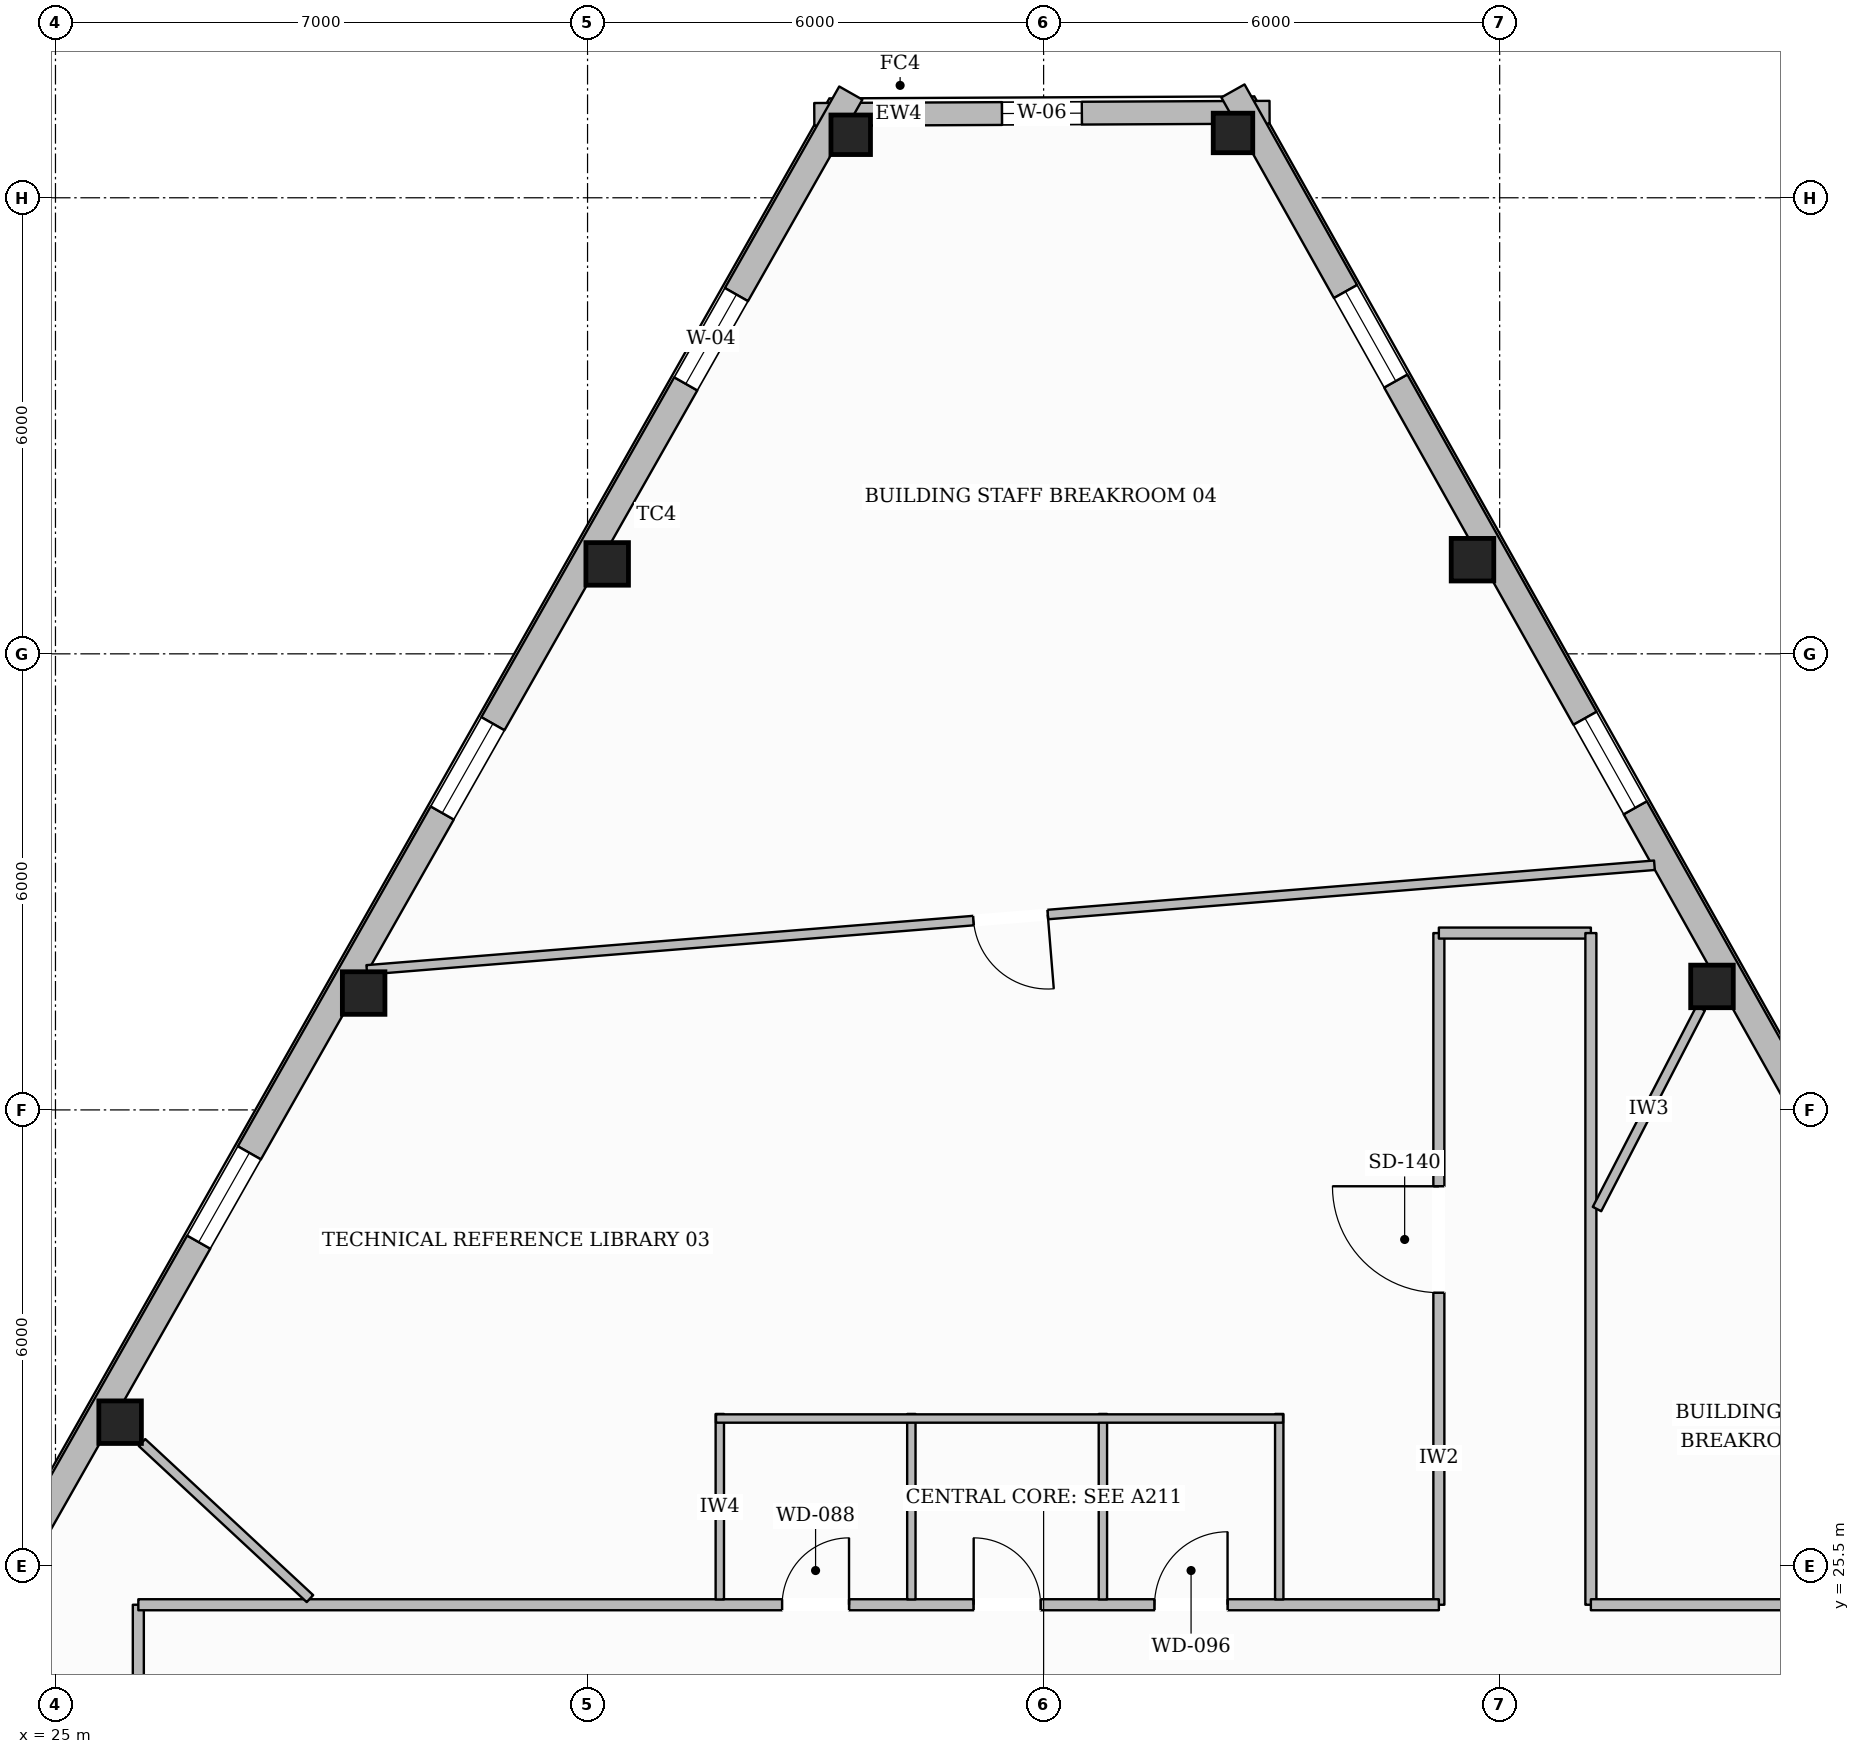
"""IFC4 building model, lengths in metres.
Left out: names, types, materials, properties, quantities, classifications, styles, units other than length and angle.
Written with IfcOpenShell. Run it as: python <this file> out.ifc"""

import sys

from ifc_helpers import new_model, si_unit, direction, frame, frame_2d, origin, origin_2d, place, context, subcontext, project, spatial, rectangle, hollow_rectangle, extrude, element, fill, save


model = new_model("IFC4")
c1 = context("Model", 3, precision=1e-05, world=origin(), true_north=direction((0.0, 1.0)))
c2 = subcontext(c1, "Body", "Model", "MODEL_VIEW")
j1 = project(units=[si_unit("LENGTHUNIT", "METRE"), si_unit("PLANEANGLEUNIT", "RADIAN")], contexts=[c1])
p1 = place(None, origin())
s1 = spatial("IfcSite", under=j1, at=p1, CompositionType="ELEMENT")
p2 = place(p1, origin())
s2 = spatial("IfcBuilding", under=s1, at=p2, CompositionType="ELEMENT")
p3 = place(p2, frame((0.0, 0.0, 301.1)))
s3 = spatial("IfcBuildingStorey", under=s2, at=p3, CompositionType="ELEMENT", Elevation=301.1)
p4 = place(p3, frame((35.462, 44.329, 0.0), z_axis=(0.0, 0.0, 1.0), x_axis=(1.0, 0.0, 0.0)))
e1 = element("IfcColumn", 1, at=p4, inside=s3, PredefinedType="COLUMN", context=c2, shape_type="SweptSolid", body=[
    extrude(hollow_rectangle(XDim=0.52, YDim=0.52, WallThickness=0.024, at=origin_2d()), origin(), (0.0, 0.0, 1.0), 3.635),
])
for number, where, z_axis, x_axis in (
    (2, (32.258, 38.683, 0.0), (0.0, 0.0, 1.0), (1.0, 0.0, 0.0)),
    (3, (29.054, 33.038, 0.0), (0.0, 0.0, 1.0), (1.0, 0.0, 0.0)),
    (4, (25.85, 27.392, 0.0), (0.0, 0.0, 1.0), (1.0, 0.0, 0.0)),
    (5, (46.793, 33.125, 0.0), (0.0, 0.0, 1.0), (1.0, 0.0, 0.0)),
    (6, (43.643, 38.739, 0.0), (0.0, 0.0, 1.0), (1.0, 0.0, 0.0)),
):
    element("IfcColumn", number, at=place(p3, frame(where, z_axis=z_axis, x_axis=x_axis)), inside=s3, PredefinedType="COLUMN", context=c2, shape_type="SweptSolid", body=[
        extrude(hollow_rectangle(XDim=0.56, YDim=0.56, WallThickness=0.025, at=origin_2d()), origin(), (0.0, 0.0, 1.0), 3.635),
    ])
p5 = place(p3, frame((40.492, 44.353, 0.0), z_axis=(0.0, 0.0, 1.0), x_axis=(1.0, 0.0, 0.0)))
e7 = element("IfcColumn", 7, at=p5, inside=s3, PredefinedType="COLUMN", context=c2, shape_type="SweptSolid", body=[
    extrude(hollow_rectangle(XDim=0.52, YDim=0.52, WallThickness=0.024, at=origin_2d()), origin(), (0.0, 0.0, 1.0), 3.635),
])
p6 = place(p3, frame((34.983, 44.596, 0.0), z_axis=(0.0, 0.0, 1.0), x_axis=(0.999988629955, 0.004768643558, 0.0)))
e8 = element("IfcWall", 8, at=p6, inside=s3, PredefinedType="STANDARD", context=c2, shape_type="SweptSolid", body=[
    extrude(rectangle(XDim=5.99, YDim=0.3, at=frame_2d((2.995, 0.0))), origin(), (0.0, 0.0, 1.0), 3.221),
])
p7 = place(p6, frame((2.47, 0.0, 0.65)))
e9 = element("IfcOpeningElement", 9, at=p7, cuts=e8, PredefinedType="OPENING", context=c2, shape_type="SweptSolid", body=[
    extrude(rectangle(XDim=1.05, YDim=1.7, at=frame_2d((0.525, 0.85))), frame((0.0, 0.16, 0.0), z_axis=(0.0, -1.0, 0.0), x_axis=(1.0, 0.0, 0.0)), (0.0, 0.0, 1.0), 0.32),
])
p8 = place(p3, frame((15.771, 10.179, 0.0), z_axis=(0.0, 0.0, 1.0), x_axis=(0.493569993775, 0.869706077503, 0.0)))
e10 = element("IfcWall", 10, at=p8, inside=s3, PredefinedType="STANDARD", context=c2, shape_type="SweptSolid", body=[
    extrude(rectangle(XDim=39.897, YDim=0.35, at=frame_2d((19.949, 0.0))), origin(), (0.0, 0.0, 1.0), 3.221),
])
p9 = place(p8, frame((35.499, 0.0, 0.65)))
e11 = element("IfcOpeningElement", 11, at=p9, cuts=e10, PredefinedType="OPENING", context=c2, shape_type="SweptSolid", body=[
    extrude(rectangle(XDim=1.35, YDim=1.75, at=frame_2d((0.675, 0.875))), frame((0.0, 0.185, 0.0), z_axis=(0.0, -1.0, 0.0), x_axis=(1.0, 0.0, 0.0)), (0.0, 0.0, 1.0), 0.37),
])
p10 = place(p8, frame((29.007, 0.0, 0.65)))
e12 = element("IfcOpeningElement", 12, at=p10, cuts=e10, PredefinedType="OPENING", context=c2, shape_type="SweptSolid", body=[
    extrude(rectangle(XDim=1.35, YDim=1.75, at=frame_2d((0.675, 0.875))), frame((0.0, 0.185, 0.0), z_axis=(0.0, -1.0, 0.0), x_axis=(1.0, 0.0, 0.0)), (0.0, 0.0, 1.0), 0.37),
])
p11 = place(p8, frame((22.516, 0.0, 0.65)))
e13 = element("IfcOpeningElement", 13, at=p11, cuts=e10, PredefinedType="OPENING", context=c2, shape_type="SweptSolid", body=[
    extrude(rectangle(XDim=1.35, YDim=1.75, at=frame_2d((0.675, 0.875))), frame((0.0, 0.185, 0.0), z_axis=(0.0, -1.0, 0.0), x_axis=(1.0, 0.0, 0.0)), (0.0, 0.0, 1.0), 0.37),
])
p12 = place(p8, frame((9.533, 0.0, 0.65)))
e14 = element("IfcOpeningElement", 14, at=p12, cuts=e10, PredefinedType="OPENING", context=c2, shape_type="SweptSolid", body=[
    extrude(rectangle(XDim=1.35, YDim=1.75, at=frame_2d((0.675, 0.875))), frame((0.0, 0.185, 0.0), z_axis=(0.0, -1.0, 0.0), x_axis=(1.0, 0.0, 0.0)), (0.0, 0.0, 1.0), 0.37),
])
p13 = place(p8, frame((3.042, 0.0, 0.65)))
e15 = element("IfcOpeningElement", 15, at=p13, cuts=e10, PredefinedType="OPENING", context=c2, shape_type="SweptSolid", body=[
    extrude(rectangle(XDim=1.35, YDim=1.75, at=frame_2d((0.675, 0.875))), frame((0.0, 0.185, 0.0), z_axis=(0.0, -1.0, 0.0), x_axis=(1.0, 0.0, 0.0)), (0.0, 0.0, 1.0), 0.37),
])
p14 = place(p3, frame((40.491, 44.906, 0.0), z_axis=(0.0, 0.0, 1.0), x_axis=(0.489429021632, -0.872043136997, 0.0)))
e16 = element("IfcWall", 16, at=p14, inside=s3, PredefinedType="STANDARD", context=c2, shape_type="SweptSolid", body=[
    extrude(rectangle(XDim=39.581, YDim=0.35, at=frame_2d((19.79, 0.0))), origin(), (0.0, 0.0, 1.0), 3.221),
])
p15 = place(p14, frame((29.085, 0.0, 0.0)))
e17 = element("IfcOpeningElement", 17, at=p15, cuts=e16, PredefinedType="OPENING", context=c2, shape_type="SweptSolid", body=[
    extrude(rectangle(XDim=1.0, YDim=2.2, at=frame_2d((0.5, 1.1))), frame((0.0, 0.185, 0.0), z_axis=(0.0, -1.0, 0.0), x_axis=(1.0, 0.0, 0.0)), (0.0, 0.0, 1.0), 0.37),
])
p16 = place(p14, frame((35.216, 0.0, 0.65)))
e18 = element("IfcOpeningElement", 18, at=p16, cuts=e16, PredefinedType="OPENING", context=c2, shape_type="SweptSolid", body=[
    extrude(rectangle(XDim=1.35, YDim=1.75, at=frame_2d((0.675, 0.875))), frame((0.0, 0.185, 0.0), z_axis=(0.0, -1.0, 0.0), x_axis=(1.0, 0.0, 0.0)), (0.0, 0.0, 1.0), 0.37),
])
p17 = place(p14, frame((22.34, 0.0, 0.65)))
e19 = element("IfcOpeningElement", 19, at=p17, cuts=e16, PredefinedType="OPENING", context=c2, shape_type="SweptSolid", body=[
    extrude(rectangle(XDim=1.35, YDim=1.75, at=frame_2d((0.675, 0.875))), frame((0.0, 0.185, 0.0), z_axis=(0.0, -1.0, 0.0), x_axis=(1.0, 0.0, 0.0)), (0.0, 0.0, 1.0), 0.37),
])
p18 = place(p14, frame((9.464, 0.0, 0.65)))
e20 = element("IfcOpeningElement", 20, at=p18, cuts=e16, PredefinedType="OPENING", context=c2, shape_type="SweptSolid", body=[
    extrude(rectangle(XDim=1.35, YDim=1.75, at=frame_2d((0.675, 0.875))), frame((0.0, 0.185, 0.0), z_axis=(0.0, -1.0, 0.0), x_axis=(1.0, 0.0, 0.0)), (0.0, 0.0, 1.0), 0.37),
])
p19 = place(p14, frame((3.026, 0.0, 0.65)))
e21 = element("IfcOpeningElement", 21, at=p19, cuts=e16, PredefinedType="OPENING", context=c2, shape_type="SweptSolid", body=[
    extrude(rectangle(XDim=1.35, YDim=1.75, at=frame_2d((0.675, 0.875))), frame((0.0, 0.185, 0.0), z_axis=(0.0, -1.0, 0.0), x_axis=(1.0, 0.0, 0.0)), (0.0, 0.0, 1.0), 0.37),
])
p20 = place(p3, frame((43.2, 24.99, 0.0), z_axis=(0.0, 0.0, 1.0), x_axis=(0.0, 1.0, 0.0)))
e22 = element("IfcWall", 22, at=p20, inside=s3, PredefinedType="PARTITIONING", context=c2, shape_type="SweptSolid", body=[
    extrude(rectangle(XDim=8.836, YDim=0.145, at=frame_2d((4.418, 0.0))), origin(), (0.0, 0.0, 1.0), 3.635),
])
p21 = place(p20, frame((4.105, 0.0, 0.0)))
e23 = element("IfcOpeningElement", 23, at=p21, cuts=e22, PredefinedType="OPENING", context=c2, shape_type="SweptSolid", body=[
    extrude(rectangle(XDim=1.4, YDim=2.2, at=frame_2d((0.7, 1.1))), frame((0.0, 0.083, 0.0), z_axis=(0.0, -1.0, 0.0), x_axis=(1.0, 0.0, 0.0)), (0.0, 0.0, 1.0), 0.165),
])
p22 = place(p3, frame((43.2, 33.826, 0.0), z_axis=(0.0, 0.0, 1.0), x_axis=(1.0, 0.0, 0.0)))
e24 = element("IfcWall", 24, at=p22, inside=s3, PredefinedType="PARTITIONING", context=c2, shape_type="SweptSolid", body=[
    extrude(rectangle(XDim=2.0, YDim=0.145, at=frame_2d((1.0, 0.0))), origin(), (0.0, 0.0, 1.0), 3.635),
])
p23 = place(p3, frame((45.2, 33.826, 0.0), z_axis=(0.0, 0.0, 1.0), x_axis=(0.0, -1.0, 0.0)))
e25 = element("IfcWall", 25, at=p23, inside=s3, PredefinedType="PARTITIONING", context=c2, shape_type="SweptSolid", body=[
    extrude(rectangle(XDim=8.836, YDim=0.145, at=frame_2d((4.418, 0.0))), origin(), (0.0, 0.0, 1.0), 3.635),
])
p24 = place(p3, frame((45.2, 24.99, 0.0), z_axis=(0.0, 0.0, 1.0), x_axis=(1.0, 0.0, 0.0)))
e26 = element("IfcWall", 26, at=p24, inside=s3, PredefinedType="PARTITIONING", context=c2, shape_type="SweptSolid", body=[
    extrude(rectangle(XDim=4.71, YDim=0.145, at=frame_2d((2.355, 0.0))), origin(), (0.0, 0.0, 1.0), 3.635),
])
p25 = place(p3, frame((26.09, 7.21, 0.0), z_axis=(0.0, 0.0, 1.0), x_axis=(0.0, 1.0, 0.0)))
e27 = element("IfcWall", 27, at=p25, inside=s3, PredefinedType="PARTITIONING", context=c2, shape_type="SweptSolid", body=[
    extrude(rectangle(XDim=17.78, YDim=0.145, at=frame_2d((8.89, 0.0))), origin(), (0.0, 0.0, 1.0), 3.374),
])
p26 = place(p25, frame((9.624, 0.0, 0.0)))
e28 = element("IfcOpeningElement", 28, at=p26, cuts=e27, PredefinedType="OPENING", context=c2, shape_type="SweptSolid", body=[
    extrude(rectangle(XDim=0.98, YDim=2.15, at=frame_2d((0.49, 1.075))), frame((0.0, 0.083, 0.0), z_axis=(0.0, -1.0, 0.0), x_axis=(1.0, 0.0, 0.0)), (0.0, 0.0, 1.0), 0.165),
])
p27 = place(p3, frame((26.09, 24.99, 0.0), z_axis=(0.0, 0.0, 1.0), x_axis=(1.0, 0.0, 0.0)))
e29 = element("IfcWall", 29, at=p27, inside=s3, PredefinedType="PARTITIONING", context=c2, shape_type="SweptSolid", body=[
    extrude(rectangle(XDim=17.11, YDim=0.145, at=frame_2d((8.555, 0.0))), origin(), (0.0, 0.0, 1.0), 3.635),
])
p28 = place(p27, frame((8.47, 0.0, 0.0)))
e30 = element("IfcOpeningElement", 30, at=p28, cuts=e29, PredefinedType="OPENING", context=c2, shape_type="SweptSolid", body=[
    extrude(rectangle(XDim=0.88, YDim=2.1, at=frame_2d((0.44, 1.05))), frame((0.0, 0.083, 0.0), z_axis=(0.0, -1.0, 0.0), x_axis=(1.0, 0.0, 0.0)), (0.0, 0.0, 1.0), 0.165),
])
p29 = place(p27, frame((10.99, 0.0, 0.0)))
e31 = element("IfcOpeningElement", 31, at=p29, cuts=e29, PredefinedType="OPENING", context=c2, shape_type="SweptSolid", body=[
    extrude(rectangle(XDim=0.88, YDim=2.1, at=frame_2d((0.44, 1.05))), frame((0.0, 0.083, 0.0), z_axis=(0.0, -1.0, 0.0), x_axis=(1.0, 0.0, 0.0)), (0.0, 0.0, 1.0), 0.165),
])
p30 = place(p27, frame((13.37, 0.0, 0.0)))
e32 = element("IfcOpeningElement", 32, at=p30, cuts=e29, PredefinedType="OPENING", context=c2, shape_type="SweptSolid", body=[
    extrude(rectangle(XDim=0.96, YDim=2.1, at=frame_2d((0.48, 1.05))), frame((0.0, 0.083, 0.0), z_axis=(0.0, -1.0, 0.0), x_axis=(1.0, 0.0, 0.0)), (0.0, 0.0, 1.0), 0.165),
])
for number, where, z_axis, x_axis in (
    (33, (33.74, 25.06, 0.0), (0.0, 0.0, 1.0), (0.0, 1.0, 0.0)),
    (34, (36.26, 25.06, 0.0), (0.0, 0.0, 1.0), (0.0, 1.0, 0.0)),
    (35, (38.78, 25.06, 0.0), (0.0, 0.0, 1.0), (0.0, 1.0, 0.0)),
    (36, (41.1, 25.06, 0.0), (0.0, 0.0, 1.0), (0.0, 1.0, 0.0)),
):
    element("IfcWall", number, at=place(p3, frame(where, z_axis=z_axis, x_axis=x_axis)), inside=s3, PredefinedType="PLUMBINGWALL", context=c2, shape_type="SweptSolid", body=[
        extrude(rectangle(XDim=2.44, YDim=0.11, at=frame_2d((1.22, 0.0))), origin(), (0.0, 0.0, 1.0), 3.635),
    ])
p31 = place(p3, frame((33.69, 27.44, 0.0), z_axis=(0.0, 0.0, 1.0), x_axis=(1.0, 0.0, 0.0)))
e37 = element("IfcWall", 37, at=p31, inside=s3, PredefinedType="PLUMBINGWALL", context=c2, shape_type="SweptSolid", body=[
    extrude(rectangle(XDim=7.46, YDim=0.11, at=frame_2d((3.73, 0.0))), origin(), (0.0, 0.0, 1.0), 3.635),
])
p32 = place(p3, frame((45.281, 30.196, 0.0), z_axis=(0.0, 0.0, 1.0), x_axis=(0.458904431831, 0.88848563435, 0.0)))
e38 = element("IfcWall", 38, at=p32, inside=s3, PredefinedType="PARTITIONING", context=c2, shape_type="SweptSolid", body=[
    extrude(rectangle(XDim=2.972, YDim=0.125, at=frame_2d((1.486, 0.0))), origin(), (0.0, 0.0, 1.0), 3.635),
])
p33 = place(p3, frame((28.348, 25.071, 0.0), z_axis=(0.0, 0.0, 1.0), x_axis=(-0.732493615347, 0.680773900407, 0.0)))
e39 = element("IfcWall", 39, at=p33, inside=s3, PredefinedType="PARTITIONING", context=c2, shape_type="SweptSolid", body=[
    extrude(rectangle(XDim=3.016, YDim=0.125, at=frame_2d((1.508, 0.0))), origin(), (0.0, 0.0, 1.0), 3.635),
])
p34 = place(p3, frame((46.036, 34.719, 0.0), z_axis=(0.0, 0.0, 1.0), x_axis=(-0.996715116999, -0.080987502409, 0.0)))
e40 = element("IfcWall", 40, at=p34, inside=s3, PredefinedType="PARTITIONING", context=c2, shape_type="SweptSolid", body=[
    extrude(rectangle(XDim=16.996, YDim=0.125, at=frame_2d((8.498, 0.0))), origin(), (0.0, 0.0, 1.0), 3.374),
])
p35 = place(p34, frame((8.008, 0.0, 0.0)))
e41 = element("IfcOpeningElement", 41, at=p35, cuts=e40, PredefinedType="OPENING", context=c2, shape_type="SweptSolid", body=[
    extrude(rectangle(XDim=0.98, YDim=2.15, at=frame_2d((0.49, 1.075))), frame((0.0, 0.073, 0.0), z_axis=(0.0, -1.0, 0.0), x_axis=(1.0, 0.0, 0.0)), (0.0, 0.0, 1.0), 0.145),
])
p36 = place(p9, origin())
e42 = element("IfcWindow", 42, at=p36, inside=s3, PartitioningType="SINGLE_PANEL", PredefinedType="WINDOW", context=c2, shape_type="SweptSolid", body=[
    extrude(rectangle(XDim=1.35, YDim=1.75, at=frame_2d((0.675, 0.875))), frame((0.0, 0.03, 0.0), z_axis=(0.0, -1.0, 0.0), x_axis=(1.0, 0.0, 0.0)), (0.0, 0.0, 1.0), 0.06),
])
fill(e11, e42)
p37 = place(p10, origin())
e43 = element("IfcWindow", 43, at=p37, inside=s3, PartitioningType="SINGLE_PANEL", PredefinedType="WINDOW", context=c2, shape_type="SweptSolid", body=[
    extrude(rectangle(XDim=1.35, YDim=1.75, at=frame_2d((0.675, 0.875))), frame((0.0, 0.03, 0.0), z_axis=(0.0, -1.0, 0.0), x_axis=(1.0, 0.0, 0.0)), (0.0, 0.0, 1.0), 0.06),
])
fill(e12, e43)
p38 = place(p11, origin())
e44 = element("IfcWindow", 44, at=p38, inside=s3, PartitioningType="SINGLE_PANEL", PredefinedType="WINDOW", context=c2, shape_type="SweptSolid", body=[
    extrude(rectangle(XDim=1.35, YDim=1.75, at=frame_2d((0.675, 0.875))), frame((0.0, 0.03, 0.0), z_axis=(0.0, -1.0, 0.0), x_axis=(1.0, 0.0, 0.0)), (0.0, 0.0, 1.0), 0.06),
])
fill(e13, e44)
p39 = place(p18, origin())
e45 = element("IfcWindow", 45, at=p39, inside=s3, PartitioningType="SINGLE_PANEL", PredefinedType="WINDOW", context=c2, shape_type="SweptSolid", body=[
    extrude(rectangle(XDim=1.35, YDim=1.75, at=frame_2d((0.675, 0.875))), frame((0.0, 0.03, 0.0), z_axis=(0.0, -1.0, 0.0), x_axis=(1.0, 0.0, 0.0)), (0.0, 0.0, 1.0), 0.06),
])
fill(e20, e45)
p40 = place(p19, origin())
e46 = element("IfcWindow", 46, at=p40, inside=s3, PartitioningType="SINGLE_PANEL", PredefinedType="WINDOW", context=c2, shape_type="SweptSolid", body=[
    extrude(rectangle(XDim=1.35, YDim=1.75, at=frame_2d((0.675, 0.875))), frame((0.0, 0.03, 0.0), z_axis=(0.0, -1.0, 0.0), x_axis=(1.0, 0.0, 0.0)), (0.0, 0.0, 1.0), 0.06),
])
fill(e21, e46)
p41 = place(p7, origin())
e47 = element("IfcWindow", 47, at=p41, inside=s3, PartitioningType="SINGLE_PANEL", PredefinedType="WINDOW", context=c2, shape_type="SweptSolid", body=[
    extrude(rectangle(XDim=1.05, YDim=1.7, at=frame_2d((0.525, 0.85))), frame((0.0, 0.03, 0.0), z_axis=(0.0, -1.0, 0.0), x_axis=(1.0, 0.0, 0.0)), (0.0, 0.0, 1.0), 0.06),
])
fill(e9, e47)
p42 = place(p28, origin())
e48 = element("IfcDoor", 48, at=p42, inside=s3, OperationType="SINGLE_SWING_RIGHT", PredefinedType="DOOR", context=c2, shape_type="SweptSolid", body=[
    extrude(rectangle(XDim=0.88, YDim=2.1, at=frame_2d((0.44, 1.05))), frame((0.0, 0.025, 0.0), z_axis=(0.0, -1.0, 0.0), x_axis=(1.0, 0.0, 0.0)), (0.0, 0.0, 1.0), 0.05),
])
fill(e30, e48)
p43 = place(p29, origin())
e49 = element("IfcDoor", 49, at=p43, inside=s3, OperationType="SINGLE_SWING_LEFT", PredefinedType="DOOR", context=c2, shape_type="SweptSolid", body=[
    extrude(rectangle(XDim=0.88, YDim=2.1, at=frame_2d((0.44, 1.05))), frame((0.0, 0.025, 0.0), z_axis=(0.0, -1.0, 0.0), x_axis=(1.0, 0.0, 0.0)), (0.0, 0.0, 1.0), 0.05),
])
fill(e31, e49)
p44 = place(p30, origin())
e50 = element("IfcDoor", 50, at=p44, inside=s3, OperationType="SINGLE_SWING_RIGHT", PredefinedType="DOOR", context=c2, shape_type="SweptSolid", body=[
    extrude(rectangle(XDim=0.96, YDim=2.1, at=frame_2d((0.48, 1.05))), frame((0.0, 0.025, 0.0), z_axis=(0.0, -1.0, 0.0), x_axis=(1.0, 0.0, 0.0)), (0.0, 0.0, 1.0), 0.05),
])
fill(e32, e50)
p45 = place(p21, origin())
e51 = element("IfcDoor", 51, at=p45, inside=s3, OperationType="SINGLE_SWING_RIGHT", PredefinedType="DOOR", context=c2, shape_type="SweptSolid", body=[
    extrude(rectangle(XDim=1.4, YDim=2.2, at=frame_2d((0.7, 1.1))), frame((0.0, 0.025, 0.0), z_axis=(0.0, -1.0, 0.0), x_axis=(1.0, 0.0, 0.0)), (0.0, 0.0, 1.0), 0.05),
])
fill(e23, e51)
p46 = place(p35, origin())
e52 = element("IfcDoor", 52, at=p46, inside=s3, OperationType="SINGLE_SWING_LEFT", PredefinedType="DOOR", context=c2, shape_type="SweptSolid", body=[
    extrude(rectangle(XDim=0.98, YDim=2.15, at=frame_2d((0.49, 1.075))), frame((0.0, 0.025, 0.0), z_axis=(0.0, -1.0, 0.0), x_axis=(1.0, 0.0, 0.0)), (0.0, 0.0, 1.0), 0.05),
])
fill(e41, e52)
save(model, sys.argv[1])
